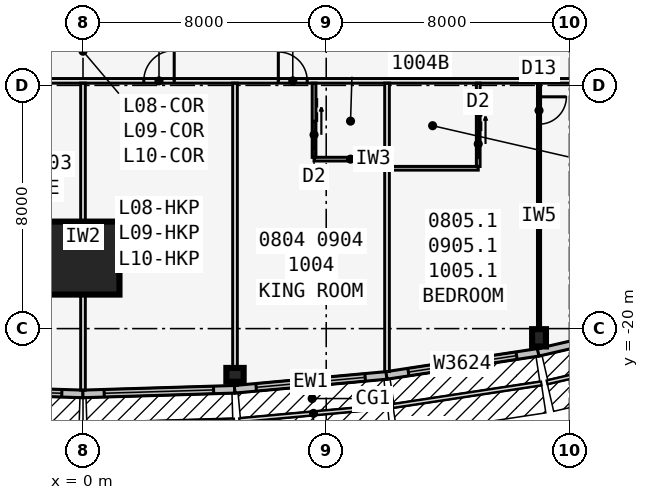
"""IFC4 building model, lengths in metres.
Left out: names, types, materials, properties, quantities, classifications, styles, units other than length and angle.
Written with IfcOpenShell. Run it as: python <this file> out.ifc"""

import sys

from ifc_helpers import new_model, si_unit, direction, frame, frame_2d, origin, origin_2d, place, context, subcontext, project, spatial, rectangle, i_section, extrude, element, fill, save


model = new_model("IFC4")
c1 = context("Model", 3, precision=1e-05, world=origin(), true_north=direction((0.0, 1.0)))
c2 = subcontext(c1, "Body", "Model", "MODEL_VIEW")
j1 = project(units=[si_unit("LENGTHUNIT", "METRE"), si_unit("PLANEANGLEUNIT", "RADIAN")], contexts=[c1])
p1 = place(None, origin())
s1 = spatial("IfcSite", under=j1, at=p1, CompositionType="ELEMENT")
p2 = place(p1, origin())
s2 = spatial("IfcBuilding", under=s1, at=p2, CompositionType="ELEMENT")
p3 = place(p2, frame((0.0, 0.0, 38.7)))
s3 = spatial("IfcBuildingStorey", under=s2, at=p3, CompositionType="ELEMENT", Elevation=38.7)
for number, where, z_axis, x_axis in (
    (1, (5.0, -21.521, 0.0), (0.0, 0.0, 1.0), (0.0, -1.0, 0.0)),
    (2, (15.0, -20.303, 0.0), (0.0, 0.0, 1.0), (1.0, 0.0, 0.0)),
):
    element("IfcColumn", number, at=place(p3, frame(where, z_axis=z_axis, x_axis=x_axis)), inside=s3, PredefinedType="COLUMN", context=c2, shape_type="SweptSolid", body=[
        extrude(i_section(OverallWidth=0.455, OverallDepth=0.569, WebThickness=0.078, FlangeThickness=0.125, at=origin_2d()), origin(), (0.0, 0.0, 1.0), 3.4),
    ])
p4 = place(p3, frame((0.0, -17.68, 0.0), z_axis=(0.0, 0.0, 1.0), x_axis=(0.0, -1.0, 0.0)))
e3 = element("IfcColumn", 3, at=p4, inside=s3, PredefinedType="COLUMN", context=c2, shape_type="SweptSolid", body=[
    extrude(rectangle(XDim=2.4, YDim=2.4, at=origin_2d()), origin(), (0.0, 0.0, 1.0), 3.4),
])
p5 = place(p3, frame((-4.996, -21.996, 0.0), z_axis=(0.0, 0.0, 1.0), x_axis=(0.999537635046, -0.030405856769, 0.0)))
e4 = element("IfcWall", 4, at=p5, inside=s3, PredefinedType="STANDARD", context=c2, shape_type="SweptSolid", body=[
    extrude(rectangle(XDim=5.002, YDim=0.25, at=frame_2d((2.501, 0.0))), origin(), (0.0, 0.0, 1.0), 3.235),
])
p6 = place(p5, frame((0.701, 0.0, 0.45)))
e5 = element("IfcOpeningElement", 5, at=p6, cuts=e4, PredefinedType="OPENING", context=c2, shape_type="SweptSolid", body=[
    extrude(rectangle(XDim=3.6, YDim=2.4, at=frame_2d((1.8, 1.2))), frame((0.0, 0.135, 0.0), z_axis=(0.0, -1.0, 0.0), x_axis=(1.0, 0.0, 0.0)), (0.0, 0.0, 1.0), 0.27),
])
p7 = place(p3, frame((-0.004, -22.148, 0.0), z_axis=(0.0, 0.0, 1.0), x_axis=(0.999537635046, 0.030405856769, 0.0)))
e6 = element("IfcWall", 6, at=p7, inside=s3, PredefinedType="STANDARD", context=c2, shape_type="SweptSolid", body=[
    extrude(rectangle(XDim=5.002, YDim=0.25, at=frame_2d((2.501, 0.0))), origin(), (0.0, 0.0, 1.0), 3.235),
])
p8 = place(p7, frame((0.701, 0.0, 0.45)))
e7 = element("IfcOpeningElement", 7, at=p8, cuts=e6, PredefinedType="OPENING", context=c2, shape_type="SweptSolid", body=[
    extrude(rectangle(XDim=3.6, YDim=2.4, at=frame_2d((1.8, 1.2))), frame((0.0, 0.135, 0.0), z_axis=(0.0, -1.0, 0.0), x_axis=(1.0, 0.0, 0.0)), (0.0, 0.0, 1.0), 0.27),
])
p9 = place(p3, frame((4.989, -21.996, 0.0), z_axis=(0.0, 0.0, 1.0), x_axis=(0.995857256774, 0.090930325692, 0.0)))
e8 = element("IfcWall", 8, at=p9, inside=s3, PredefinedType="STANDARD", context=c2, shape_type="SweptSolid", body=[
    extrude(rectangle(XDim=5.021, YDim=0.25, at=frame_2d((2.51, 0.0))), origin(), (0.0, 0.0, 1.0), 3.235),
])
p10 = place(p9, frame((0.71, 0.0, 0.45)))
e9 = element("IfcOpeningElement", 9, at=p10, cuts=e8, PredefinedType="OPENING", context=c2, shape_type="SweptSolid", body=[
    extrude(rectangle(XDim=3.6, YDim=2.4, at=frame_2d((1.8, 1.2))), frame((0.0, 0.135, 0.0), z_axis=(0.0, -1.0, 0.0), x_axis=(1.0, 0.0, 0.0)), (0.0, 0.0, 1.0), 0.27),
])
p11 = place(p3, frame((9.981, -21.54, 0.0), z_axis=(0.0, 0.0, 1.0), x_axis=(0.988615403399, 0.150464561152, 0.0)))
e10 = element("IfcWall", 10, at=p11, inside=s3, PredefinedType="STANDARD", context=c2, shape_type="SweptSolid", body=[
    extrude(rectangle(XDim=5.058, YDim=0.25, at=frame_2d((2.529, 0.0))), origin(), (0.0, 0.0, 1.0), 3.235),
])
p12 = place(p11, frame((0.729, 0.0, 0.45)))
e11 = element("IfcOpeningElement", 11, at=p12, cuts=e10, PredefinedType="OPENING", context=c2, shape_type="SweptSolid", body=[
    extrude(rectangle(XDim=3.6, YDim=2.4, at=frame_2d((1.8, 1.2))), frame((0.0, 0.135, 0.0), z_axis=(0.0, -1.0, 0.0), x_axis=(1.0, 0.0, 0.0)), (0.0, 0.0, 1.0), 0.27),
])
p13 = place(p3, frame((14.972, -20.781, 0.0), z_axis=(0.0, 0.0, 1.0), x_axis=(0.974279327392, 0.225343720163, 0.0)))
e12 = element("IfcWall", 12, at=p13, inside=s3, PredefinedType="STANDARD", context=c2, shape_type="SweptSolid", body=[
    extrude(rectangle(XDim=8.211, YDim=0.25, at=frame_2d((4.105, 0.0))), origin(), (0.0, 0.0, 1.0), 3.235),
])
p14 = place(p13, frame((2.006, 0.0, 0.45)))
e13 = element("IfcOpeningElement", 13, at=p14, cuts=e12, PredefinedType="OPENING", context=c2, shape_type="SweptSolid", body=[
    extrude(rectangle(XDim=4.2, YDim=2.4, at=frame_2d((2.1, 1.2))), frame((0.0, 0.135, 0.0), z_axis=(0.0, -1.0, 0.0), x_axis=(1.0, 0.0, 0.0)), (0.0, 0.0, 1.0), 0.27),
])
p15 = place(p3, frame((-19.527, -11.851, 0.0), z_axis=(0.0, 0.0, 1.0), x_axis=(1.0, 0.0, 0.0)))
e14 = element("IfcWall", 14, at=p15, inside=s3, PredefinedType="PARTITIONING", context=c2, shape_type="SweptSolid", body=[
    extrude(rectangle(XDim=39.054, YDim=0.15, at=frame_2d((19.527, 0.0))), origin(), (0.0, 0.0, 1.0), 3.235),
])
p16 = place(p15, frame((0.352, 0.0, 0.0)))
e15 = element("IfcOpeningElement", 15, at=p16, cuts=e14, PredefinedType="OPENING", context=c2, shape_type="SweptSolid", body=[
    extrude(rectangle(XDim=0.95, YDim=2.13, at=frame_2d((0.475, 1.065))), frame((0.0, 0.085, 0.0), z_axis=(0.0, -1.0, 0.0), x_axis=(1.0, 0.0, 0.0)), (0.0, 0.0, 1.0), 0.17),
])
p17 = place(p15, frame((5.352, 0.0, 0.0)))
e16 = element("IfcOpeningElement", 16, at=p17, cuts=e14, PredefinedType="OPENING", context=c2, shape_type="SweptSolid", body=[
    extrude(rectangle(XDim=0.95, YDim=2.13, at=frame_2d((0.475, 1.065))), frame((0.0, 0.085, 0.0), z_axis=(0.0, -1.0, 0.0), x_axis=(1.0, 0.0, 0.0)), (0.0, 0.0, 1.0), 0.17),
])
p18 = place(p15, frame((12.752, 0.0, 0.0)))
e17 = element("IfcOpeningElement", 17, at=p18, cuts=e14, PredefinedType="OPENING", context=c2, shape_type="SweptSolid", body=[
    extrude(rectangle(XDim=0.95, YDim=2.13, at=frame_2d((0.475, 1.065))), frame((0.0, 0.085, 0.0), z_axis=(0.0, -1.0, 0.0), x_axis=(1.0, 0.0, 0.0)), (0.0, 0.0, 1.0), 0.17),
])
p19 = place(p15, frame((21.527, 0.0, 0.0)))
e18 = element("IfcOpeningElement", 18, at=p19, cuts=e14, PredefinedType="OPENING", context=c2, shape_type="SweptSolid", body=[
    extrude(rectangle(XDim=1.0, YDim=2.13, at=frame_2d((0.5, 1.065))), frame((0.0, 0.085, 0.0), z_axis=(0.0, -1.0, 0.0), x_axis=(1.0, 0.0, 0.0)), (0.0, 0.0, 1.0), 0.17),
])
p20 = place(p15, frame((25.952, 0.0, 0.0)))
e19 = element("IfcOpeningElement", 19, at=p20, cuts=e14, PredefinedType="OPENING", context=c2, shape_type="SweptSolid", body=[
    extrude(rectangle(XDim=0.95, YDim=2.13, at=frame_2d((0.475, 1.065))), frame((0.0, 0.085, 0.0), z_axis=(0.0, -1.0, 0.0), x_axis=(1.0, 0.0, 0.0)), (0.0, 0.0, 1.0), 0.17),
])
p21 = place(p15, frame((36.546, 0.0, 0.0)))
e20 = element("IfcOpeningElement", 20, at=p21, cuts=e14, PredefinedType="OPENING", context=c2, shape_type="SweptSolid", body=[
    extrude(rectangle(XDim=0.95, YDim=2.13, at=frame_2d((0.475, 1.065))), frame((0.0, 0.085, 0.0), z_axis=(0.0, -1.0, 0.0), x_axis=(1.0, 0.0, 0.0)), (0.0, 0.0, 1.0), 0.17),
])
p22 = place(p3, frame((0.0, -11.926, 0.0), z_axis=(0.0, 0.0, 1.0), x_axis=(0.0, -1.0, 0.0)))
e21 = element("IfcWall", 21, at=p22, inside=s3, PredefinedType="PARTITIONING", context=c2, shape_type="SweptSolid", body=[
    extrude(rectangle(XDim=10.096, YDim=0.15, at=frame_2d((5.048, 0.0))), origin(), (0.0, 0.0, 1.0), 2.389),
])
p23 = place(p3, frame((5.0, -11.926, 0.0), z_axis=(0.0, 0.0, 1.0), x_axis=(0.0, -1.0, 0.0)))
e22 = element("IfcWall", 22, at=p23, inside=s3, PredefinedType="PARTITIONING", context=c2, shape_type="SweptSolid", body=[
    extrude(rectangle(XDim=9.943, YDim=0.15, at=frame_2d((4.972, 0.0))), origin(), (0.0, 0.0, 1.0), 2.389),
])
p24 = place(p3, frame((10.0, -11.926, 0.0), z_axis=(0.0, 0.0, 1.0), x_axis=(0.0, -1.0, 0.0)))
e23 = element("IfcWall", 23, at=p24, inside=s3, PredefinedType="PARTITIONING", context=c2, shape_type="SweptSolid", body=[
    extrude(rectangle(XDim=9.485, YDim=0.15, at=frame_2d((4.742, 0.0))), origin(), (0.0, 0.0, 1.0), 2.389),
])
p25 = place(p3, frame((15.0, -11.926, 0.0), z_axis=(0.0, 0.0, 1.0), x_axis=(0.0, -1.0, 0.0)))
e24 = element("IfcWall", 24, at=p25, inside=s3, PredefinedType="PARTITIONING", context=c2, shape_type="SweptSolid", body=[
    extrude(rectangle(XDim=8.72, YDim=0.1, at=frame_2d((4.36, 0.0))), origin(), (0.0, 0.0, 1.0), 2.389),
])
p26 = place(p25, frame((0.45, 0.0, 0.0)))
e25 = element("IfcOpeningElement", 25, at=p26, cuts=e24, PredefinedType="OPENING", context=c2, shape_type="SweptSolid", body=[
    extrude(rectangle(XDim=0.9, YDim=2.13, at=frame_2d((0.45, 1.065))), frame((0.0, 0.06, 0.0), z_axis=(0.0, -1.0, 0.0), x_axis=(1.0, 0.0, 0.0)), (0.0, 0.0, 1.0), 0.12),
])
p27 = place(p3, frame((7.6, -14.426, 0.0), z_axis=(0.0, 0.0, 1.0), x_axis=(1.0, 0.0, 0.0)))
e26 = element("IfcWall", 26, at=p27, inside=s3, PredefinedType="PLUMBINGWALL", context=c2, shape_type="SweptSolid", body=[
    extrude(rectangle(XDim=2.4, YDim=0.12, at=frame_2d((1.2, 0.0))), origin(), (0.0, 0.0, 1.0), 3.235),
])
p28 = place(p3, frame((7.6, -11.926, 0.0), z_axis=(0.0, 0.0, 1.0), x_axis=(0.0, -1.0, 0.0)))
e27 = element("IfcWall", 27, at=p28, inside=s3, PredefinedType="PLUMBINGWALL", context=c2, shape_type="SweptSolid", body=[
    extrude(rectangle(XDim=2.44, YDim=0.12, at=frame_2d((1.22, 0.0))), origin(), (0.0, 0.0, 1.0), 3.235),
])
p29 = place(p28, frame((1.25, 0.0, 0.0)))
e28 = element("IfcOpeningElement", 28, at=p29, cuts=e27, PredefinedType="OPENING", context=c2, shape_type="SweptSolid", body=[
    extrude(rectangle(XDim=0.9, YDim=2.13, at=frame_2d((0.45, 1.065))), frame((0.0, 0.07, 0.0), z_axis=(0.0, -1.0, 0.0), x_axis=(1.0, 0.0, 0.0)), (0.0, 0.0, 1.0), 0.14),
])
p30 = place(p3, frame((10.0, -14.726, 0.0), z_axis=(0.0, 0.0, 1.0), x_axis=(1.0, 0.0, 0.0)))
e29 = element("IfcWall", 29, at=p30, inside=s3, PredefinedType="PLUMBINGWALL", context=c2, shape_type="SweptSolid", body=[
    extrude(rectangle(XDim=3.0, YDim=0.12, at=frame_2d((1.5, 0.0))), origin(), (0.0, 0.0, 1.0), 3.235),
])
p31 = place(p3, frame((13.0, -11.926, 0.0), z_axis=(0.0, 0.0, 1.0), x_axis=(0.0, -1.0, 0.0)))
e30 = element("IfcWall", 30, at=p31, inside=s3, PredefinedType="PLUMBINGWALL", context=c2, shape_type="SweptSolid", body=[
    extrude(rectangle(XDim=2.74, YDim=0.12, at=frame_2d((1.37, 0.0))), origin(), (0.0, 0.0, 1.0), 3.235),
])
p32 = place(p31, frame((1.55, 0.0, 0.0)))
e31 = element("IfcOpeningElement", 31, at=p32, cuts=e30, PredefinedType="OPENING", context=c2, shape_type="SweptSolid", body=[
    extrude(rectangle(XDim=0.9, YDim=2.13, at=frame_2d((0.45, 1.065))), frame((0.0, 0.07, 0.0), z_axis=(0.0, -1.0, 0.0), x_axis=(1.0, 0.0, 0.0)), (0.0, 0.0, 1.0), 0.14),
])
p33 = place(p3, frame((21.586, -11.885, 0.0), z_axis=(0.0, 0.0, 1.0), x_axis=(-0.500001915564, 0.86602429783, 0.0)))
e32 = element("IfcWall", 32, at=p33, inside=s3, PredefinedType="PARTITIONING", context=c2, shape_type="SweptSolid", body=[
    extrude(rectangle(XDim=42.172, YDim=0.15, at=frame_2d((21.086, 0.0))), origin(), (0.0, 0.0, 1.0), 3.235),
])
p34 = place(p33, frame((1.911, 0.0, 0.0)))
e33 = element("IfcOpeningElement", 33, at=p34, cuts=e32, PredefinedType="OPENING", context=c2, shape_type="SweptSolid", body=[
    extrude(rectangle(XDim=0.95, YDim=2.13, at=frame_2d((0.475, 1.065))), frame((0.0, 0.085, 0.0), z_axis=(0.0, -1.0, 0.0), x_axis=(1.0, 0.0, 0.0)), (0.0, 0.0, 1.0), 0.17),
])
p35 = place(p33, frame((7.511, 0.0, 0.0)))
e34 = element("IfcOpeningElement", 34, at=p35, cuts=e32, PredefinedType="OPENING", context=c2, shape_type="SweptSolid", body=[
    extrude(rectangle(XDim=0.95, YDim=2.13, at=frame_2d((0.475, 1.065))), frame((0.0, 0.085, 0.0), z_axis=(0.0, -1.0, 0.0), x_axis=(1.0, 0.0, 0.0)), (0.0, 0.0, 1.0), 0.17),
])
p36 = place(p33, frame((13.711, 0.0, 0.0)))
e35 = element("IfcOpeningElement", 35, at=p36, cuts=e32, PredefinedType="OPENING", context=c2, shape_type="SweptSolid", body=[
    extrude(rectangle(XDim=0.95, YDim=2.13, at=frame_2d((0.475, 1.065))), frame((0.0, 0.085, 0.0), z_axis=(0.0, -1.0, 0.0), x_axis=(1.0, 0.0, 0.0)), (0.0, 0.0, 1.0), 0.17),
])
p37 = place(p33, frame((21.911, 0.0, 0.0)))
e36 = element("IfcOpeningElement", 36, at=p37, cuts=e32, PredefinedType="OPENING", context=c2, shape_type="SweptSolid", body=[
    extrude(rectangle(XDim=0.95, YDim=2.13, at=frame_2d((0.475, 1.065))), frame((0.0, 0.085, 0.0), z_axis=(0.0, -1.0, 0.0), x_axis=(1.0, 0.0, 0.0)), (0.0, 0.0, 1.0), 0.17),
])
p38 = place(p33, frame((28.711, 0.0, 0.0)))
e37 = element("IfcOpeningElement", 37, at=p38, cuts=e32, PredefinedType="OPENING", context=c2, shape_type="SweptSolid", body=[
    extrude(rectangle(XDim=0.95, YDim=2.13, at=frame_2d((0.475, 1.065))), frame((0.0, 0.085, 0.0), z_axis=(0.0, -1.0, 0.0), x_axis=(1.0, 0.0, 0.0)), (0.0, 0.0, 1.0), 0.17),
])
p39 = place(p33, frame((31.911, 0.0, 0.0)))
e38 = element("IfcOpeningElement", 38, at=p39, cuts=e32, PredefinedType="OPENING", context=c2, shape_type="SweptSolid", body=[
    extrude(rectangle(XDim=0.95, YDim=2.13, at=frame_2d((0.475, 1.065))), frame((0.0, 0.085, 0.0), z_axis=(0.0, -1.0, 0.0), x_axis=(1.0, 0.0, 0.0)), (0.0, 0.0, 1.0), 0.17),
])
p40 = place(p33, frame((39.311, 0.0, 0.0)))
e39 = element("IfcOpeningElement", 39, at=p40, cuts=e32, PredefinedType="OPENING", context=c2, shape_type="SweptSolid", body=[
    extrude(rectangle(XDim=0.95, YDim=2.13, at=frame_2d((0.475, 1.065))), frame((0.0, 0.085, 0.0), z_axis=(0.0, -1.0, 0.0), x_axis=(1.0, 0.0, 0.0)), (0.0, 0.0, 1.0), 0.17),
])
p41 = place(p3, frame((-0.5, 22.836, 0.0), z_axis=(0.0, 0.0, 1.0), x_axis=(-0.500001677587, -0.866024435227, 0.0)))
e40 = element("IfcWall", 40, at=p41, inside=s3, PredefinedType="PARTITIONING", context=c2, shape_type="SweptSolid", body=[
    extrude(rectangle(XDim=39.054, YDim=0.15, at=frame_2d((19.527, 0.0))), origin(), (0.0, 0.0, 1.0), 3.235),
])
p42 = place(p41, frame((0.352, 0.0, 0.0)))
e41 = element("IfcOpeningElement", 41, at=p42, cuts=e40, PredefinedType="OPENING", context=c2, shape_type="SweptSolid", body=[
    extrude(rectangle(XDim=0.95, YDim=2.13, at=frame_2d((0.475, 1.065))), frame((0.0, 0.085, 0.0), z_axis=(0.0, -1.0, 0.0), x_axis=(1.0, 0.0, 0.0)), (0.0, 0.0, 1.0), 0.17),
])
p43 = place(p41, frame((5.952, 0.0, 0.0)))
e42 = element("IfcOpeningElement", 42, at=p43, cuts=e40, PredefinedType="OPENING", context=c2, shape_type="SweptSolid", body=[
    extrude(rectangle(XDim=0.95, YDim=2.13, at=frame_2d((0.475, 1.065))), frame((0.0, 0.085, 0.0), z_axis=(0.0, -1.0, 0.0), x_axis=(1.0, 0.0, 0.0)), (0.0, 0.0, 1.0), 0.17),
])
p44 = place(p41, frame((11.552, 0.0, 0.0)))
e43 = element("IfcOpeningElement", 43, at=p44, cuts=e40, PredefinedType="OPENING", context=c2, shape_type="SweptSolid", body=[
    extrude(rectangle(XDim=0.95, YDim=2.13, at=frame_2d((0.475, 1.065))), frame((0.0, 0.085, 0.0), z_axis=(0.0, -1.0, 0.0), x_axis=(1.0, 0.0, 0.0)), (0.0, 0.0, 1.0), 0.17),
])
p45 = place(p41, frame((21.552, 0.0, 0.0)))
e44 = element("IfcOpeningElement", 44, at=p45, cuts=e40, PredefinedType="OPENING", context=c2, shape_type="SweptSolid", body=[
    extrude(rectangle(XDim=0.95, YDim=2.13, at=frame_2d((0.475, 1.065))), frame((0.0, 0.085, 0.0), z_axis=(0.0, -1.0, 0.0), x_axis=(1.0, 0.0, 0.0)), (0.0, 0.0, 1.0), 0.17),
])
p46 = place(p41, frame((30.952, 0.0, 0.0)))
e45 = element("IfcOpeningElement", 45, at=p46, cuts=e40, PredefinedType="OPENING", context=c2, shape_type="SweptSolid", body=[
    extrude(rectangle(XDim=0.95, YDim=2.13, at=frame_2d((0.475, 1.065))), frame((0.0, 0.085, 0.0), z_axis=(0.0, -1.0, 0.0), x_axis=(1.0, 0.0, 0.0)), (0.0, 0.0, 1.0), 0.17),
])
p47 = place(p41, frame((37.752, 0.0, 0.0)))
e46 = element("IfcOpeningElement", 46, at=p47, cuts=e40, PredefinedType="OPENING", context=c2, shape_type="SweptSolid", body=[
    extrude(rectangle(XDim=0.95, YDim=2.13, at=frame_2d((0.475, 1.065))), frame((0.0, 0.085, 0.0), z_axis=(0.0, -1.0, 0.0), x_axis=(1.0, 0.0, 0.0)), (0.0, 0.0, 1.0), 0.17),
])
p48 = place(p6, origin())
e47 = element("IfcWindow", 47, at=p48, inside=s3, PartitioningType="SINGLE_PANEL", PredefinedType="WINDOW", context=c2, shape_type="SweptSolid", body=[
    extrude(rectangle(XDim=3.6, YDim=2.4, at=frame_2d((1.8, 1.2))), frame((0.0, 0.03, 0.0), z_axis=(0.0, -1.0, 0.0), x_axis=(1.0, 0.0, 0.0)), (0.0, 0.0, 1.0), 0.06),
])
fill(e5, e47)
p49 = place(p8, origin())
e48 = element("IfcWindow", 48, at=p49, inside=s3, PartitioningType="SINGLE_PANEL", PredefinedType="WINDOW", context=c2, shape_type="SweptSolid", body=[
    extrude(rectangle(XDim=3.6, YDim=2.4, at=frame_2d((1.8, 1.2))), frame((0.0, 0.03, 0.0), z_axis=(0.0, -1.0, 0.0), x_axis=(1.0, 0.0, 0.0)), (0.0, 0.0, 1.0), 0.06),
])
fill(e7, e48)
p50 = place(p10, origin())
e49 = element("IfcWindow", 49, at=p50, inside=s3, PartitioningType="SINGLE_PANEL", PredefinedType="WINDOW", context=c2, shape_type="SweptSolid", body=[
    extrude(rectangle(XDim=3.6, YDim=2.4, at=frame_2d((1.8, 1.2))), frame((0.0, 0.03, 0.0), z_axis=(0.0, -1.0, 0.0), x_axis=(1.0, 0.0, 0.0)), (0.0, 0.0, 1.0), 0.06),
])
fill(e9, e49)
p51 = place(p12, origin())
e50 = element("IfcWindow", 50, at=p51, inside=s3, PartitioningType="SINGLE_PANEL", PredefinedType="WINDOW", context=c2, shape_type="SweptSolid", body=[
    extrude(rectangle(XDim=3.6, YDim=2.4, at=frame_2d((1.8, 1.2))), frame((0.0, 0.03, 0.0), z_axis=(0.0, -1.0, 0.0), x_axis=(1.0, 0.0, 0.0)), (0.0, 0.0, 1.0), 0.06),
])
fill(e11, e50)
p52 = place(p26, origin())
e51 = element("IfcDoor", 51, at=p52, inside=s3, OperationType="SINGLE_SWING_LEFT", PredefinedType="DOOR", context=c2, shape_type="SweptSolid", body=[
    extrude(rectangle(XDim=0.9, YDim=2.13, at=frame_2d((0.45, 1.065))), frame((0.0, 0.025, 0.0), z_axis=(0.0, -1.0, 0.0), x_axis=(1.0, 0.0, 0.0)), (0.0, 0.0, 1.0), 0.05),
])
fill(e25, e51)
p53 = place(p19, origin())
e52 = element("IfcDoor", 52, at=p53, inside=s3, OperationType="SINGLE_SWING_RIGHT", PredefinedType="DOOR", context=c2, shape_type="SweptSolid", body=[
    extrude(rectangle(XDim=1.0, YDim=2.13, at=frame_2d((0.5, 1.065))), frame((0.0, 0.025, 0.0), z_axis=(0.0, -1.0, 0.0), x_axis=(1.0, 0.0, 0.0)), (0.0, 0.0, 1.0), 0.05),
])
fill(e18, e52)
p54 = place(p29, origin())
e53 = element("IfcDoor", 53, at=p54, inside=s3, OperationType="SLIDING_TO_LEFT", PredefinedType="DOOR", context=c2, shape_type="SweptSolid", body=[
    extrude(rectangle(XDim=0.9, YDim=2.13, at=frame_2d((0.45, 1.065))), frame((0.0, 0.025, 0.0), z_axis=(0.0, -1.0, 0.0), x_axis=(1.0, 0.0, 0.0)), (0.0, 0.0, 1.0), 0.05),
])
fill(e28, e53)
p55 = place(p20, origin())
e54 = element("IfcDoor", 54, at=p55, inside=s3, OperationType="SINGLE_SWING_LEFT", PredefinedType="DOOR", context=c2, shape_type="SweptSolid", body=[
    extrude(rectangle(XDim=0.95, YDim=2.13, at=frame_2d((0.475, 1.065))), frame((0.0, 0.025, 0.0), z_axis=(0.0, -1.0, 0.0), x_axis=(1.0, 0.0, 0.0)), (0.0, 0.0, 1.0), 0.05),
])
fill(e19, e54)
p56 = place(p32, origin())
e55 = element("IfcDoor", 55, at=p56, inside=s3, OperationType="SLIDING_TO_LEFT", PredefinedType="DOOR", context=c2, shape_type="SweptSolid", body=[
    extrude(rectangle(XDim=0.9, YDim=2.13, at=frame_2d((0.45, 1.065))), frame((0.0, 0.025, 0.0), z_axis=(0.0, -1.0, 0.0), x_axis=(1.0, 0.0, 0.0)), (0.0, 0.0, 1.0), 0.05),
])
fill(e31, e55)
save(model, sys.argv[1])
